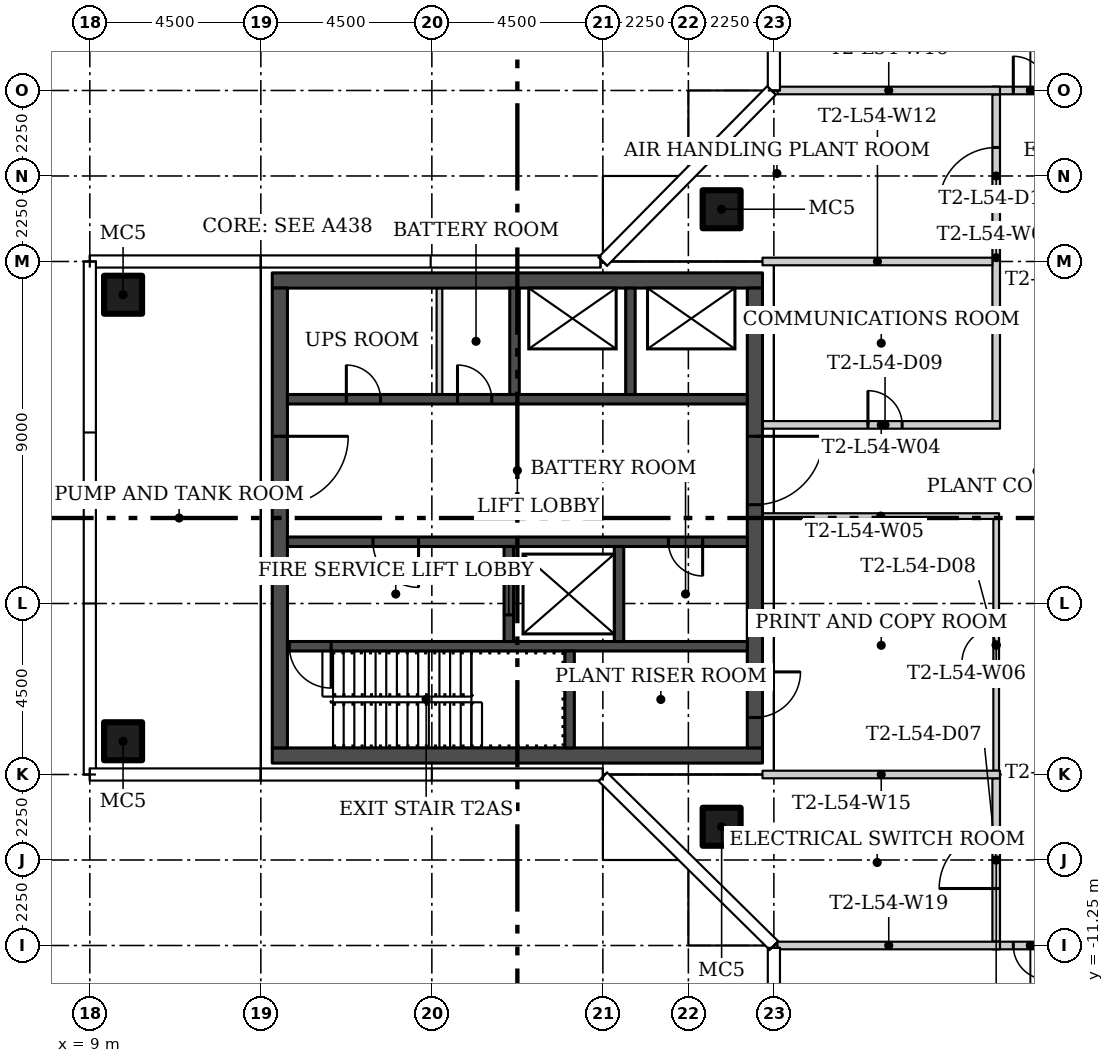
"""IFC4 building model, lengths in metres.
Left out: names, types, materials, properties, quantities, classifications, styles, units other than length and angle.
Written with IfcOpenShell. Run it as: python <this file> out.ifc"""

import sys

from ifc_helpers import new_model, si_unit, direction, frame, frame_2d, origin, origin_2d, place, context, subcontext, project, spatial, rectangle, hollow_rectangle, extrude, element, fill, save


model = new_model("IFC4")
c1 = context("Model", 3, precision=1e-05, world=origin(), true_north=direction((0.0, 1.0)))
c2 = subcontext(c1, "Body", "Model", "MODEL_VIEW")
j1 = project(units=[si_unit("LENGTHUNIT", "METRE"), si_unit("PLANEANGLEUNIT", "RADIAN")], contexts=[c1])
p1 = place(None, origin())
s1 = spatial("IfcSite", under=j1, at=p1, CompositionType="ELEMENT")
p2 = place(p1, origin())
s2 = spatial("IfcBuilding", under=s1, at=p2, CompositionType="ELEMENT")
p3 = place(p2, frame((0.0, 0.0, 225.6)))
s3 = spatial("IfcBuildingStorey", under=s2, at=p3, CompositionType="ELEMENT", Elevation=225.6)
for number, where in (
    (1, (25.625, 8.125, 0.0)),
    (2, (25.625, -8.125, 0.0)),
    (3, (9.875, -5.875, 0.0)),
    (4, (9.875, 5.875, 0.0)),
):
    element("IfcColumn", number, at=place(p3, frame(where)), inside=s3, PredefinedType="COLUMN", context=c2, shape_type="SweptSolid", body=[
        extrude(hollow_rectangle(XDim=1.0, YDim=1.0, WallThickness=0.04, at=origin_2d()), origin(), (0.0, 0.0, 1.0), 4.45),
    ])
p4 = place(p3, frame((32.85, 2.55, 0.0), z_axis=(0.0, 0.0, 1.0), x_axis=(0.0, 1.0, 0.0)))
e5 = element("IfcWall", 5, at=p4, inside=s3, PredefinedType="PARTITIONING", context=c2, shape_type="SweptSolid", body=[
    extrude(rectangle(XDim=8.6, YDim=0.2, at=frame_2d((4.3, 0.0))), origin(), (0.0, 0.0, 1.0), 4.45),
])
p5 = place(p4, frame((5.7, 0.0, 0.0)))
e6 = element("IfcOpeningElement", 6, at=p5, cuts=e5, PredefinedType="OPENING", context=c2, shape_type="SweptSolid", body=[
    extrude(rectangle(XDim=1.5, YDim=2.4, at=frame_2d((0.75, 1.2))), frame((0.0, 0.11, 0.0), z_axis=(0.0, -1.0, 0.0), x_axis=(1.0, 0.0, 0.0)), (0.0, 0.0, 1.0), 0.22),
])
p6 = place(p3, frame((32.85, -11.15, 0.0), z_axis=(0.0, 0.0, 1.0), x_axis=(0.0, 1.0, 0.0)))
e7 = element("IfcWall", 7, at=p6, inside=s3, PredefinedType="PARTITIONING", context=c2, shape_type="SweptSolid", body=[
    extrude(rectangle(XDim=4.3, YDim=0.2, at=frame_2d((2.15, 0.0))), origin(), (0.0, 0.0, 1.0), 4.45),
])
p7 = place(p6, frame((1.4, 0.0, 0.0)))
e8 = element("IfcOpeningElement", 8, at=p7, cuts=e7, PredefinedType="OPENING", context=c2, shape_type="SweptSolid", body=[
    extrude(rectangle(XDim=1.5, YDim=2.4, at=frame_2d((0.75, 1.2))), frame((0.0, 0.11, 0.0), z_axis=(0.0, -1.0, 0.0), x_axis=(1.0, 0.0, 0.0)), (0.0, 0.0, 1.0), 0.22),
])
p8 = place(p3, frame((26.7, 2.45, 0.0)))
e9 = element("IfcWall", 9, at=p8, inside=s3, PredefinedType="PARTITIONING", context=c2, shape_type="SweptSolid", body=[
    extrude(rectangle(XDim=6.25, YDim=0.2, at=frame_2d((3.125, 0.0))), origin(), (0.0, 0.0, 1.0), 4.45),
])
p9 = place(p8, frame((2.775, 0.0, 0.0)))
e10 = element("IfcOpeningElement", 10, at=p9, cuts=e9, PredefinedType="OPENING", context=c2, shape_type="SweptSolid", body=[
    extrude(rectangle(XDim=0.9, YDim=2.1, at=frame_2d((0.45, 1.05))), frame((0.0, 0.11, 0.0), z_axis=(0.0, -1.0, 0.0), x_axis=(1.0, 0.0, 0.0)), (0.0, 0.0, 1.0), 0.22),
])
p10 = place(p3, frame((32.925, 0.05, 0.0), z_axis=(0.0, 0.0, 1.0), x_axis=(-1.0, 0.0, 0.0)))
e11 = element("IfcWall", 11, at=p10, inside=s3, PredefinedType="PARTITIONING", context=c2, shape_type="SweptSolid", body=[
    extrude(rectangle(XDim=6.225, YDim=0.15, at=frame_2d((3.112, 0.0))), origin(), (0.0, 0.0, 1.0), 4.45),
])
p11 = place(p3, frame((32.85, -6.65, 0.0), z_axis=(0.0, 0.0, 1.0), x_axis=(0.0, 1.0, 0.0)))
e12 = element("IfcWall", 12, at=p11, inside=s3, PredefinedType="PARTITIONING", context=c2, shape_type="SweptSolid", body=[
    extrude(rectangle(XDim=6.625, YDim=0.15, at=frame_2d((3.312, 0.0))), origin(), (0.0, 0.0, 1.0), 4.45),
])
p12 = place(p11, frame((2.85, 0.0, 0.0)))
e13 = element("IfcOpeningElement", 13, at=p12, cuts=e12, PredefinedType="OPENING", context=c2, shape_type="SweptSolid", body=[
    extrude(rectangle(XDim=0.9, YDim=2.1, at=frame_2d((0.45, 1.05))), frame((0.0, 0.085, 0.0), z_axis=(0.0, -1.0, 0.0), x_axis=(1.0, 0.0, 0.0)), (0.0, 0.0, 1.0), 0.17),
])
p13 = place(p3, frame((32.75, 11.25, 0.0)))
e14 = element("IfcWall", 14, at=p13, inside=s3, PredefinedType="PARTITIONING", context=c2, shape_type="SweptSolid", body=[
    extrude(rectangle(XDim=2.001, YDim=0.2, at=frame_2d((1.0, 0.0))), origin(), (0.0, 0.0, 1.0), 4.45),
])
p14 = place(p13, frame((0.55, 0.0, 0.0)))
e15 = element("IfcOpeningElement", 15, at=p14, cuts=e14, PredefinedType="OPENING", context=c2, shape_type="SweptSolid", body=[
    extrude(rectangle(XDim=0.9, YDim=2.4, at=frame_2d((0.45, 1.2))), frame((0.0, 0.11, 0.0), z_axis=(0.0, -1.0, 0.0), x_axis=(1.0, 0.0, 0.0)), (0.0, 0.0, 1.0), 0.22),
])
p15 = place(p3, frame((34.75, -11.25, 0.0), z_axis=(0.0, 0.0, 1.0), x_axis=(-1.0, 0.0, 0.0)))
e16 = element("IfcWall", 16, at=p15, inside=s3, PredefinedType="PARTITIONING", context=c2, shape_type="SweptSolid", body=[
    extrude(rectangle(XDim=2.001, YDim=0.2, at=frame_2d((1.0, 0.0))), origin(), (0.0, 0.0, 1.0), 4.45),
])
p16 = place(p15, frame((0.55, 0.0, 0.0)))
e17 = element("IfcOpeningElement", 17, at=p16, cuts=e16, PredefinedType="OPENING", context=c2, shape_type="SweptSolid", body=[
    extrude(rectangle(XDim=0.9, YDim=2.4, at=frame_2d((0.45, 1.2))), frame((0.0, 0.11, 0.0), z_axis=(0.0, -1.0, 0.0), x_axis=(1.0, 0.0, 0.0)), (0.0, 0.0, 1.0), 0.22),
])
p17 = place(p3, frame((32.75, 6.75, 0.0), z_axis=(0.0, 0.0, 1.0), x_axis=(-1.0, 0.0, 0.0)))
e18 = element("IfcWall", 18, at=p17, inside=s3, PredefinedType="PARTITIONING", context=c2, shape_type="SweptSolid", body=[
    extrude(rectangle(XDim=6.05, YDim=0.2, at=frame_2d((3.025, 0.0))), origin(), (0.0, 0.0, 1.0), 4.45),
])
p18 = place(p3, frame((26.7, -6.75, 0.0)))
e19 = element("IfcWall", 19, at=p18, inside=s3, PredefinedType="PARTITIONING", context=c2, shape_type="SweptSolid", body=[
    extrude(rectangle(XDim=6.25, YDim=0.2, at=frame_2d((3.125, 0.0))), origin(), (0.0, 0.0, 1.0), 4.45),
])
p19 = place(p3, frame((32.95, 11.25, 0.0), z_axis=(0.0, 0.0, 1.0), x_axis=(-1.0, 0.0, 0.0)))
e20 = element("IfcWall", 20, at=p19, inside=s3, PredefinedType="PARTITIONING", context=c2, shape_type="SweptSolid", body=[
    extrude(rectangle(XDim=5.855, YDim=0.2, at=frame_2d((2.927, 0.0))), origin(), (0.0, 0.0, 1.0), 4.45),
])
p20 = place(p3, frame((27.095, -11.25, 0.0)))
e21 = element("IfcWall", 21, at=p20, inside=s3, PredefinedType="PARTITIONING", context=c2, shape_type="SweptSolid", body=[
    extrude(rectangle(XDim=5.855, YDim=0.2, at=frame_2d((2.927, 0.0))), origin(), (0.0, 0.0, 1.0), 4.45),
])
for number, where in (
    (22, (13.8, -6.25, 0.0)),
    (23, (13.8, 6.25, 0.0)),
):
    element("IfcWall", number, at=place(p3, frame(where)), inside=s3, PredefinedType="SHEAR", context=c2, shape_type="SweptSolid", body=[
        extrude(rectangle(XDim=12.9, YDim=0.4, at=frame_2d((6.45, 0.0))), origin(), (0.0, 0.0, 1.0), 4.45),
    ])
p21 = place(p3, frame((14.0, 6.05, 0.0), z_axis=(0.0, 0.0, 1.0), x_axis=(0.0, -1.0, 0.0)))
e24 = element("IfcWall", 24, at=p21, inside=s3, PredefinedType="SHEAR", context=c2, shape_type="SweptSolid", body=[
    extrude(rectangle(XDim=12.1, YDim=0.4, at=frame_2d((6.05, 0.0))), origin(), (0.0, 0.0, 1.0), 4.45),
])
p22 = place(p21, frame((3.9, 0.0, 0.0)))
e25 = element("IfcOpeningElement", 25, at=p22, cuts=e24, PredefinedType="OPENING", context=c2, shape_type="SweptSolid", body=[
    extrude(rectangle(XDim=1.8, YDim=2.4, at=frame_2d((0.9, 1.2))), frame((0.0, 0.21, 0.0), z_axis=(0.0, -1.0, 0.0), x_axis=(1.0, 0.0, 0.0)), (0.0, 0.0, 1.0), 0.42),
])
p23 = place(p3, frame((26.5, 6.05, 0.0), z_axis=(0.0, 0.0, 1.0), x_axis=(0.0, -1.0, 0.0)))
e26 = element("IfcWall", 26, at=p23, inside=s3, PredefinedType="SHEAR", context=c2, shape_type="SweptSolid", body=[
    extrude(rectangle(XDim=12.1, YDim=0.4, at=frame_2d((6.05, 0.0))), origin(), (0.0, 0.0, 1.0), 4.45),
])
p24 = place(p23, frame((10.1, 0.0, 0.0)))
e27 = element("IfcOpeningElement", 27, at=p24, cuts=e26, PredefinedType="OPENING", context=c2, shape_type="SweptSolid", body=[
    extrude(rectangle(XDim=1.2, YDim=2.1, at=frame_2d((0.6, 1.05))), frame((0.0, 0.21, 0.0), z_axis=(0.0, -1.0, 0.0), x_axis=(1.0, 0.0, 0.0)), (0.0, 0.0, 1.0), 0.42),
])
p25 = place(p23, frame((3.9, 0.0, 0.0)))
e28 = element("IfcOpeningElement", 28, at=p25, cuts=e26, PredefinedType="OPENING", context=c2, shape_type="SweptSolid", body=[
    extrude(rectangle(XDim=1.8, YDim=2.4, at=frame_2d((0.9, 1.2))), frame((0.0, 0.21, 0.0), z_axis=(0.0, -1.0, 0.0), x_axis=(1.0, 0.0, 0.0)), (0.0, 0.0, 1.0), 0.42),
])
p26 = place(p3, frame((26.3, -3.375, 0.0), z_axis=(0.0, 0.0, 1.0), x_axis=(-1.0, 0.0, 0.0)))
e29 = element("IfcWall", 29, at=p26, inside=s3, PredefinedType="SHEAR", context=c2, shape_type="SweptSolid", body=[
    extrude(rectangle(XDim=12.1, YDim=0.25, at=frame_2d((6.05, 0.0))), origin(), (0.0, 0.0, 1.0), 4.45),
])
p27 = place(p26, frame((10.95, 0.0, 0.0)))
e30 = element("IfcOpeningElement", 30, at=p27, cuts=e29, PredefinedType="OPENING", context=c2, shape_type="SweptSolid", body=[
    extrude(rectangle(XDim=1.1, YDim=2.1, at=frame_2d((0.55, 1.05))), frame((0.0, 0.135, 0.0), z_axis=(0.0, -1.0, 0.0), x_axis=(1.0, 0.0, 0.0)), (0.0, 0.0, 1.0), 0.27),
])
p28 = place(p3, frame((21.625, -6.05, 0.0), z_axis=(0.0, 0.0, 1.0), x_axis=(0.0, 1.0, 0.0)))
e31 = element("IfcWall", 31, at=p28, inside=s3, PredefinedType="SHEAR", context=c2, shape_type="SweptSolid", body=[
    extrude(rectangle(XDim=2.55, YDim=0.25, at=frame_2d((1.275, 0.0))), origin(), (0.0, 0.0, 1.0), 4.45),
])
p29 = place(p3, frame((26.3, -0.625, 0.0), z_axis=(0.0, 0.0, 1.0), x_axis=(-1.0, 0.0, 0.0)))
e32 = element("IfcWall", 32, at=p29, inside=s3, PredefinedType="SHEAR", context=c2, shape_type="SweptSolid", body=[
    extrude(rectangle(XDim=12.1, YDim=0.25, at=frame_2d((6.05, 0.0))), origin(), (0.0, 0.0, 1.0), 4.45),
])
p30 = place(p29, frame((8.65, 0.0, 0.0)))
e33 = element("IfcOpeningElement", 33, at=p30, cuts=e32, PredefinedType="OPENING", context=c2, shape_type="SweptSolid", body=[
    extrude(rectangle(XDim=1.2, YDim=2.1, at=frame_2d((0.6, 1.05))), frame((0.0, 0.135, 0.0), z_axis=(0.0, -1.0, 0.0), x_axis=(1.0, 0.0, 0.0)), (0.0, 0.0, 1.0), 0.27),
])
p31 = place(p29, frame((1.175, 0.0, 0.0)))
e34 = element("IfcOpeningElement", 34, at=p31, cuts=e32, PredefinedType="OPENING", context=c2, shape_type="SweptSolid", body=[
    extrude(rectangle(XDim=0.9, YDim=2.1, at=frame_2d((0.45, 1.05))), frame((0.0, 0.135, 0.0), z_axis=(0.0, -1.0, 0.0), x_axis=(1.0, 0.0, 0.0)), (0.0, 0.0, 1.0), 0.27),
])
p32 = place(p3, frame((20.025, -3.25, 0.0), z_axis=(0.0, 0.0, 1.0), x_axis=(0.0, 1.0, 0.0)))
e35 = element("IfcWall", 35, at=p32, inside=s3, PredefinedType="SHEAR", context=c2, shape_type="SweptSolid", body=[
    extrude(rectangle(XDim=2.5, YDim=0.25, at=frame_2d((1.25, 0.0))), origin(), (0.0, 0.0, 1.0), 4.45),
])
p33 = place(p32, frame((0.7, 0.0, 0.0)))
e36 = element("IfcOpeningElement", 36, at=p33, cuts=e35, PredefinedType="OPENING", context=c2, shape_type="SweptSolid", body=[
    extrude(rectangle(XDim=1.1, YDim=2.1, at=frame_2d((0.55, 1.05))), frame((0.0, 0.135, 0.0), z_axis=(0.0, -1.0, 0.0), x_axis=(1.0, 0.0, 0.0)), (0.0, 0.0, 1.0), 0.27),
])
p34 = place(p3, frame((22.925, -3.25, 0.0), z_axis=(0.0, 0.0, 1.0), x_axis=(0.0, 1.0, 0.0)))
e37 = element("IfcWall", 37, at=p34, inside=s3, PredefinedType="SHEAR", context=c2, shape_type="SweptSolid", body=[
    extrude(rectangle(XDim=2.5, YDim=0.25, at=frame_2d((1.25, 0.0))), origin(), (0.0, 0.0, 1.0), 4.45),
])
p35 = place(p3, frame((14.2, 3.125, 0.0)))
e38 = element("IfcWall", 38, at=p35, inside=s3, PredefinedType="SHEAR", context=c2, shape_type="SweptSolid", body=[
    extrude(rectangle(XDim=12.1, YDim=0.25, at=frame_2d((6.05, 0.0))), origin(), (0.0, 0.0, 1.0), 4.45),
])
p36 = place(p35, frame((1.55, 0.0, 0.0)))
e39 = element("IfcOpeningElement", 39, at=p36, cuts=e38, PredefinedType="OPENING", context=c2, shape_type="SweptSolid", body=[
    extrude(rectangle(XDim=0.9, YDim=2.1, at=frame_2d((0.45, 1.05))), frame((0.0, 0.135, 0.0), z_axis=(0.0, -1.0, 0.0), x_axis=(1.0, 0.0, 0.0)), (0.0, 0.0, 1.0), 0.27),
])
p37 = place(p35, frame((4.475, 0.0, 0.0)))
e40 = element("IfcOpeningElement", 40, at=p37, cuts=e38, PredefinedType="OPENING", context=c2, shape_type="SweptSolid", body=[
    extrude(rectangle(XDim=0.9, YDim=2.1, at=frame_2d((0.45, 1.05))), frame((0.0, 0.135, 0.0), z_axis=(0.0, -1.0, 0.0), x_axis=(1.0, 0.0, 0.0)), (0.0, 0.0, 1.0), 0.27),
])
for number, where, z_axis, x_axis in (
    (41, (20.175, 3.25, 0.0), (0.0, 0.0, 1.0), (0.0, 1.0, 0.0)),
    (42, (23.225, 3.25, 0.0), (0.0, 0.0, 1.0), (0.0, 1.0, 0.0)),
):
    element("IfcWall", number, at=place(p3, frame(where, z_axis=z_axis, x_axis=x_axis)), inside=s3, PredefinedType="SHEAR", context=c2, shape_type="SweptSolid", body=[
        extrude(rectangle(XDim=2.8, YDim=0.25, at=frame_2d((1.4, 0.0))), origin(), (0.0, 0.0, 1.0), 4.45),
    ])
p38 = place(p3, frame((18.2, 3.25, 0.0), z_axis=(0.0, 0.0, 1.0), x_axis=(0.0, 1.0, 0.0)))
e43 = element("IfcWall", 43, at=p38, inside=s3, PredefinedType="PARTITIONING", context=c2, shape_type="SweptSolid", body=[
    extrude(rectangle(XDim=2.8, YDim=0.15, at=frame_2d((1.4, 0.0))), origin(), (0.0, 0.0, 1.0), 4.45),
])
p39 = place(p14, origin())
e44 = element("IfcDoor", 44, at=p39, inside=s3, OperationType="SINGLE_SWING_LEFT", PredefinedType="DOOR", context=c2, shape_type="SweptSolid", body=[
    extrude(rectangle(XDim=0.9, YDim=2.4, at=frame_2d((0.45, 1.2))), frame((0.0, 0.025, 0.0), z_axis=(0.0, -1.0, 0.0), x_axis=(1.0, 0.0, 0.0)), (0.0, 0.0, 1.0), 0.05),
])
fill(e15, e44)
p40 = place(p16, origin())
e45 = element("IfcDoor", 45, at=p40, inside=s3, OperationType="SINGLE_SWING_LEFT", PredefinedType="DOOR", context=c2, shape_type="SweptSolid", body=[
    extrude(rectangle(XDim=0.9, YDim=2.4, at=frame_2d((0.45, 1.2))), frame((0.0, 0.025, 0.0), z_axis=(0.0, -1.0, 0.0), x_axis=(1.0, 0.0, 0.0)), (0.0, 0.0, 1.0), 0.05),
])
fill(e17, e45)
p41 = place(p7, origin())
e46 = element("IfcDoor", 46, at=p41, inside=s3, OperationType="DOUBLE_DOOR_SINGLE_SWING", PredefinedType="DOOR", context=c2, shape_type="SweptSolid", body=[
    extrude(rectangle(XDim=1.5, YDim=2.4, at=frame_2d((0.75, 1.2))), frame((0.0, 0.025, 0.0), z_axis=(0.0, -1.0, 0.0), x_axis=(1.0, 0.0, 0.0)), (0.0, 0.0, 1.0), 0.05),
])
fill(e8, e46)
p42 = place(p12, origin())
e47 = element("IfcDoor", 47, at=p42, inside=s3, OperationType="SINGLE_SWING_RIGHT", PredefinedType="DOOR", context=c2, shape_type="SweptSolid", body=[
    extrude(rectangle(XDim=0.9, YDim=2.1, at=frame_2d((0.45, 1.05))), frame((0.0, 0.025, 0.0), z_axis=(0.0, -1.0, 0.0), x_axis=(1.0, 0.0, 0.0)), (0.0, 0.0, 1.0), 0.05),
])
fill(e13, e47)
p43 = place(p9, origin())
e48 = element("IfcDoor", 48, at=p43, inside=s3, OperationType="SINGLE_SWING_LEFT", PredefinedType="DOOR", context=c2, shape_type="SweptSolid", body=[
    extrude(rectangle(XDim=0.9, YDim=2.1, at=frame_2d((0.45, 1.05))), frame((0.0, 0.025, 0.0), z_axis=(0.0, -1.0, 0.0), x_axis=(1.0, 0.0, 0.0)), (0.0, 0.0, 1.0), 0.05),
])
fill(e10, e48)
p44 = place(p5, origin())
e49 = element("IfcDoor", 49, at=p44, inside=s3, OperationType="DOUBLE_DOOR_SINGLE_SWING", PredefinedType="DOOR", context=c2, shape_type="SweptSolid", body=[
    extrude(rectangle(XDim=1.5, YDim=2.4, at=frame_2d((0.75, 1.2))), frame((0.0, 0.025, 0.0), z_axis=(0.0, -1.0, 0.0), x_axis=(1.0, 0.0, 0.0)), (0.0, 0.0, 1.0), 0.05),
])
fill(e6, e49)
p45 = place(p22, origin())
e50 = element("IfcDoor", 50, at=p45, inside=s3, OperationType="DOUBLE_DOOR_SINGLE_SWING", PredefinedType="DOOR", context=c2, shape_type="SweptSolid", body=[
    extrude(rectangle(XDim=1.8, YDim=2.4, at=frame_2d((0.9, 1.2))), frame((0.0, 0.025, 0.0), z_axis=(0.0, -1.0, 0.0), x_axis=(1.0, 0.0, 0.0)), (0.0, 0.0, 1.0), 0.05),
])
fill(e25, e50)
p46 = place(p24, origin())
e51 = element("IfcDoor", 51, at=p46, inside=s3, OperationType="SINGLE_SWING_RIGHT", PredefinedType="DOOR", context=c2, shape_type="SweptSolid", body=[
    extrude(rectangle(XDim=1.2, YDim=2.1, at=frame_2d((0.6, 1.05))), frame((0.0, 0.025, 0.0), z_axis=(0.0, -1.0, 0.0), x_axis=(1.0, 0.0, 0.0)), (0.0, 0.0, 1.0), 0.05),
])
fill(e27, e51)
p47 = place(p25, origin())
e52 = element("IfcDoor", 52, at=p47, inside=s3, OperationType="DOUBLE_DOOR_SINGLE_SWING", PredefinedType="DOOR", context=c2, shape_type="SweptSolid", body=[
    extrude(rectangle(XDim=1.8, YDim=2.4, at=frame_2d((0.9, 1.2))), frame((0.0, 0.025, 0.0), z_axis=(0.0, -1.0, 0.0), x_axis=(1.0, 0.0, 0.0)), (0.0, 0.0, 1.0), 0.05),
])
fill(e28, e52)
p48 = place(p27, origin())
e53 = element("IfcDoor", 53, at=p48, inside=s3, OperationType="SINGLE_SWING_RIGHT", PredefinedType="DOOR", context=c2, shape_type="SweptSolid", body=[
    extrude(rectangle(XDim=1.1, YDim=2.1, at=frame_2d((0.55, 1.05))), frame((0.0, 0.025, 0.0), z_axis=(0.0, -1.0, 0.0), x_axis=(1.0, 0.0, 0.0)), (0.0, 0.0, 1.0), 0.05),
])
fill(e30, e53)
p49 = place(p30, origin())
e54 = element("IfcDoor", 54, at=p49, inside=s3, OperationType="SINGLE_SWING_RIGHT", PredefinedType="DOOR", context=c2, shape_type="SweptSolid", body=[
    extrude(rectangle(XDim=1.2, YDim=2.1, at=frame_2d((0.6, 1.05))), frame((0.0, 0.025, 0.0), z_axis=(0.0, -1.0, 0.0), x_axis=(1.0, 0.0, 0.0)), (0.0, 0.0, 1.0), 0.05),
])
fill(e33, e54)
p50 = place(p31, origin())
e55 = element("IfcDoor", 55, at=p50, inside=s3, OperationType="SINGLE_SWING_LEFT", PredefinedType="DOOR", context=c2, shape_type="SweptSolid", body=[
    extrude(rectangle(XDim=0.9, YDim=2.1, at=frame_2d((0.45, 1.05))), frame((0.0, 0.025, 0.0), z_axis=(0.0, -1.0, 0.0), x_axis=(1.0, 0.0, 0.0)), (0.0, 0.0, 1.0), 0.05),
])
fill(e34, e55)
p51 = place(p33, origin())
e56 = element("IfcDoor", 56, at=p51, inside=s3, OperationType="SLIDING_TO_LEFT", PredefinedType="DOOR", context=c2, shape_type="SweptSolid", body=[
    extrude(rectangle(XDim=1.1, YDim=2.1, at=frame_2d((0.55, 1.05))), frame((0.0, 0.025, 0.0), z_axis=(0.0, -1.0, 0.0), x_axis=(1.0, 0.0, 0.0)), (0.0, 0.0, 1.0), 0.05),
])
fill(e36, e56)
p52 = place(p36, origin())
e57 = element("IfcDoor", 57, at=p52, inside=s3, OperationType="SINGLE_SWING_LEFT", PredefinedType="DOOR", context=c2, shape_type="SweptSolid", body=[
    extrude(rectangle(XDim=0.9, YDim=2.1, at=frame_2d((0.45, 1.05))), frame((0.0, 0.025, 0.0), z_axis=(0.0, -1.0, 0.0), x_axis=(1.0, 0.0, 0.0)), (0.0, 0.0, 1.0), 0.05),
])
fill(e39, e57)
p53 = place(p37, origin())
e58 = element("IfcDoor", 58, at=p53, inside=s3, OperationType="SINGLE_SWING_LEFT", PredefinedType="DOOR", context=c2, shape_type="SweptSolid", body=[
    extrude(rectangle(XDim=0.9, YDim=2.1, at=frame_2d((0.45, 1.05))), frame((0.0, 0.025, 0.0), z_axis=(0.0, -1.0, 0.0), x_axis=(1.0, 0.0, 0.0)), (0.0, 0.0, 1.0), 0.05),
])
fill(e40, e58)
save(model, sys.argv[1])
